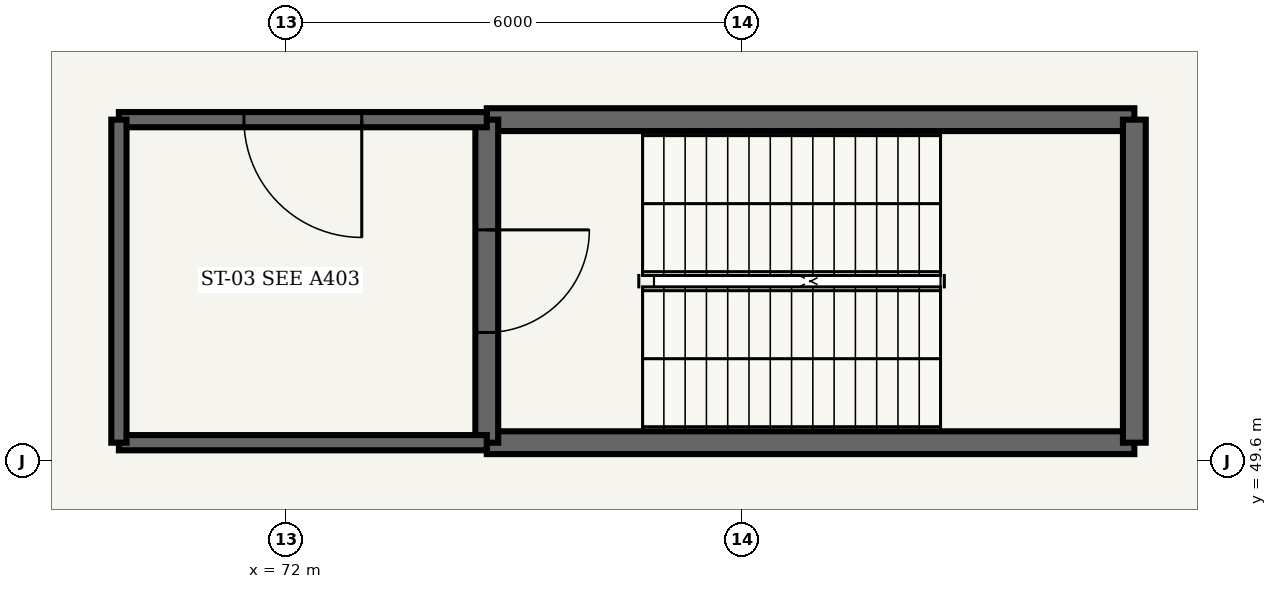
"""IFC4 building model, lengths in metres.
Left out: names, types, materials, properties, quantities, classifications, styles, units other than length and angle.
Written with IfcOpenShell. Run it as: python <this file> out.ifc"""

import sys

from ifc_helpers import new_model, si_unit, direction, frame, frame_2d, origin, place, context, subcontext, project, spatial, rectangle, extrude, element, fill, save


model = new_model("IFC4")
c1 = context("Model", 3, precision=1e-05, world=origin(), true_north=direction((0.0, 1.0)))
c2 = subcontext(c1, "Body", "Model", "MODEL_VIEW")
j1 = project(units=[si_unit("LENGTHUNIT", "METRE"), si_unit("PLANEANGLEUNIT", "RADIAN")], contexts=[c1])
p1 = place(None, origin())
s1 = spatial("IfcSite", under=j1, at=p1, CompositionType="ELEMENT")
p2 = place(p1, origin())
s2 = spatial("IfcBuilding", under=s1, at=p2, CompositionType="ELEMENT")
p3 = place(p2, frame((0.0, 0.0, 5.4)))
s3 = spatial("IfcBuildingStorey", under=s2, at=p3, CompositionType="ELEMENT", Elevation=5.4)
for number, where, z_axis, x_axis in (
    (1, (74.64, 49.84, 0.0), (0.0, 0.0, 1.0), (1.0, 0.0, 0.0)),
    (2, (83.16, 54.09, 0.0), (0.0, 0.0, 1.0), (-1.0, 0.0, 0.0)),
):
    element("IfcWall", number, at=place(p3, frame(where, z_axis=z_axis, x_axis=x_axis)), inside=s3, PredefinedType="SHEAR", context=c2, shape_type="SweptSolid", body=[
        extrude(rectangle(XDim=8.52, YDim=0.3, at=frame_2d((4.26, 0.0))), origin(), (0.0, 0.0, 1.0), 5.15),
    ])
p4 = place(p3, frame((74.64, 54.09, 0.0), z_axis=(0.0, 0.0, 1.0), x_axis=(0.0, -1.0, 0.0)))
e3 = element("IfcWall", 3, at=p4, inside=s3, PredefinedType="SHEAR", context=c2, shape_type="SweptSolid", body=[
    extrude(rectangle(XDim=4.25, YDim=0.3, at=frame_2d((2.125, 0.0))), origin(), (0.0, 0.0, 1.0), 5.15),
])
p5 = place(p4, frame((1.45, 0.0, 0.0)))
e4 = element("IfcOpeningElement", 4, at=p5, cuts=e3, PredefinedType="OPENING", context=c2, shape_type="SweptSolid", body=[
    extrude(rectangle(XDim=1.35, YDim=2.2, at=frame_2d((0.675, 1.1))), frame((0.0, 0.16, 0.0), z_axis=(0.0, -1.0, 0.0), x_axis=(1.0, 0.0, 0.0)), (0.0, 0.0, 1.0), 0.32),
])
p6 = place(p3, frame((83.16, 49.84, 0.0), z_axis=(0.0, 0.0, 1.0), x_axis=(0.0, 1.0, 0.0)))
e5 = element("IfcWall", 5, at=p6, inside=s3, PredefinedType="SHEAR", context=c2, shape_type="SweptSolid", body=[
    extrude(rectangle(XDim=4.25, YDim=0.3, at=frame_2d((2.125, 0.0))), origin(), (0.0, 0.0, 1.0), 5.15),
])
p7 = place(p3, frame((69.8, 49.84, 0.0), z_axis=(0.0, 0.0, 1.0), x_axis=(1.0, 0.0, 0.0)))
e6 = element("IfcWall", 6, at=p7, inside=s3, PredefinedType="SHEAR", context=c2, shape_type="SweptSolid", body=[
    extrude(rectangle(XDim=4.84, YDim=0.2, at=frame_2d((2.42, 0.0))), origin(), (0.0, 0.0, 1.0), 5.15),
])
p8 = place(p3, frame((74.64, 54.09, 0.0), z_axis=(0.0, 0.0, 1.0), x_axis=(-1.0, 0.0, 0.0)))
e7 = element("IfcWall", 7, at=p8, inside=s3, PredefinedType="SHEAR", context=c2, shape_type="SweptSolid", body=[
    extrude(rectangle(XDim=4.84, YDim=0.2, at=frame_2d((2.42, 0.0))), origin(), (0.0, 0.0, 1.0), 5.15),
])
p9 = place(p8, frame((1.645, 0.0, 0.0)))
e8 = element("IfcOpeningElement", 8, at=p9, cuts=e7, PredefinedType="OPENING", context=c2, shape_type="SweptSolid", body=[
    extrude(rectangle(XDim=1.55, YDim=2.2, at=frame_2d((0.775, 1.1))), frame((0.0, 0.11, 0.0), z_axis=(0.0, -1.0, 0.0), x_axis=(1.0, 0.0, 0.0)), (0.0, 0.0, 1.0), 0.22),
])
p10 = place(p3, frame((69.8, 54.09, 0.0), z_axis=(0.0, 0.0, 1.0), x_axis=(0.0, -1.0, 0.0)))
e9 = element("IfcWall", 9, at=p10, inside=s3, PredefinedType="SHEAR", context=c2, shape_type="SweptSolid", body=[
    extrude(rectangle(XDim=4.25, YDim=0.2, at=frame_2d((2.125, 0.0))), origin(), (0.0, 0.0, 1.0), 5.15),
])
p11 = place(p5, origin())
e10 = element("IfcDoor", 10, at=p11, inside=s3, OperationType="SINGLE_SWING_LEFT", PredefinedType="DOOR", context=c2, shape_type="SweptSolid", body=[
    extrude(rectangle(XDim=1.35, YDim=2.2, at=frame_2d((0.675, 1.1))), frame((0.0, 0.025, 0.0), z_axis=(0.0, -1.0, 0.0), x_axis=(1.0, 0.0, 0.0)), (0.0, 0.0, 1.0), 0.05),
])
fill(e4, e10)
p12 = place(p9, origin())
e11 = element("IfcDoor", 11, at=p12, inside=s3, OperationType="SINGLE_SWING_LEFT", PredefinedType="DOOR", context=c2, shape_type="SweptSolid", body=[
    extrude(rectangle(XDim=1.55, YDim=2.2, at=frame_2d((0.775, 1.1))), frame((0.0, 0.025, 0.0), z_axis=(0.0, -1.0, 0.0), x_axis=(1.0, 0.0, 0.0)), (0.0, 0.0, 1.0), 0.05),
])
fill(e8, e11)
save(model, sys.argv[1])
